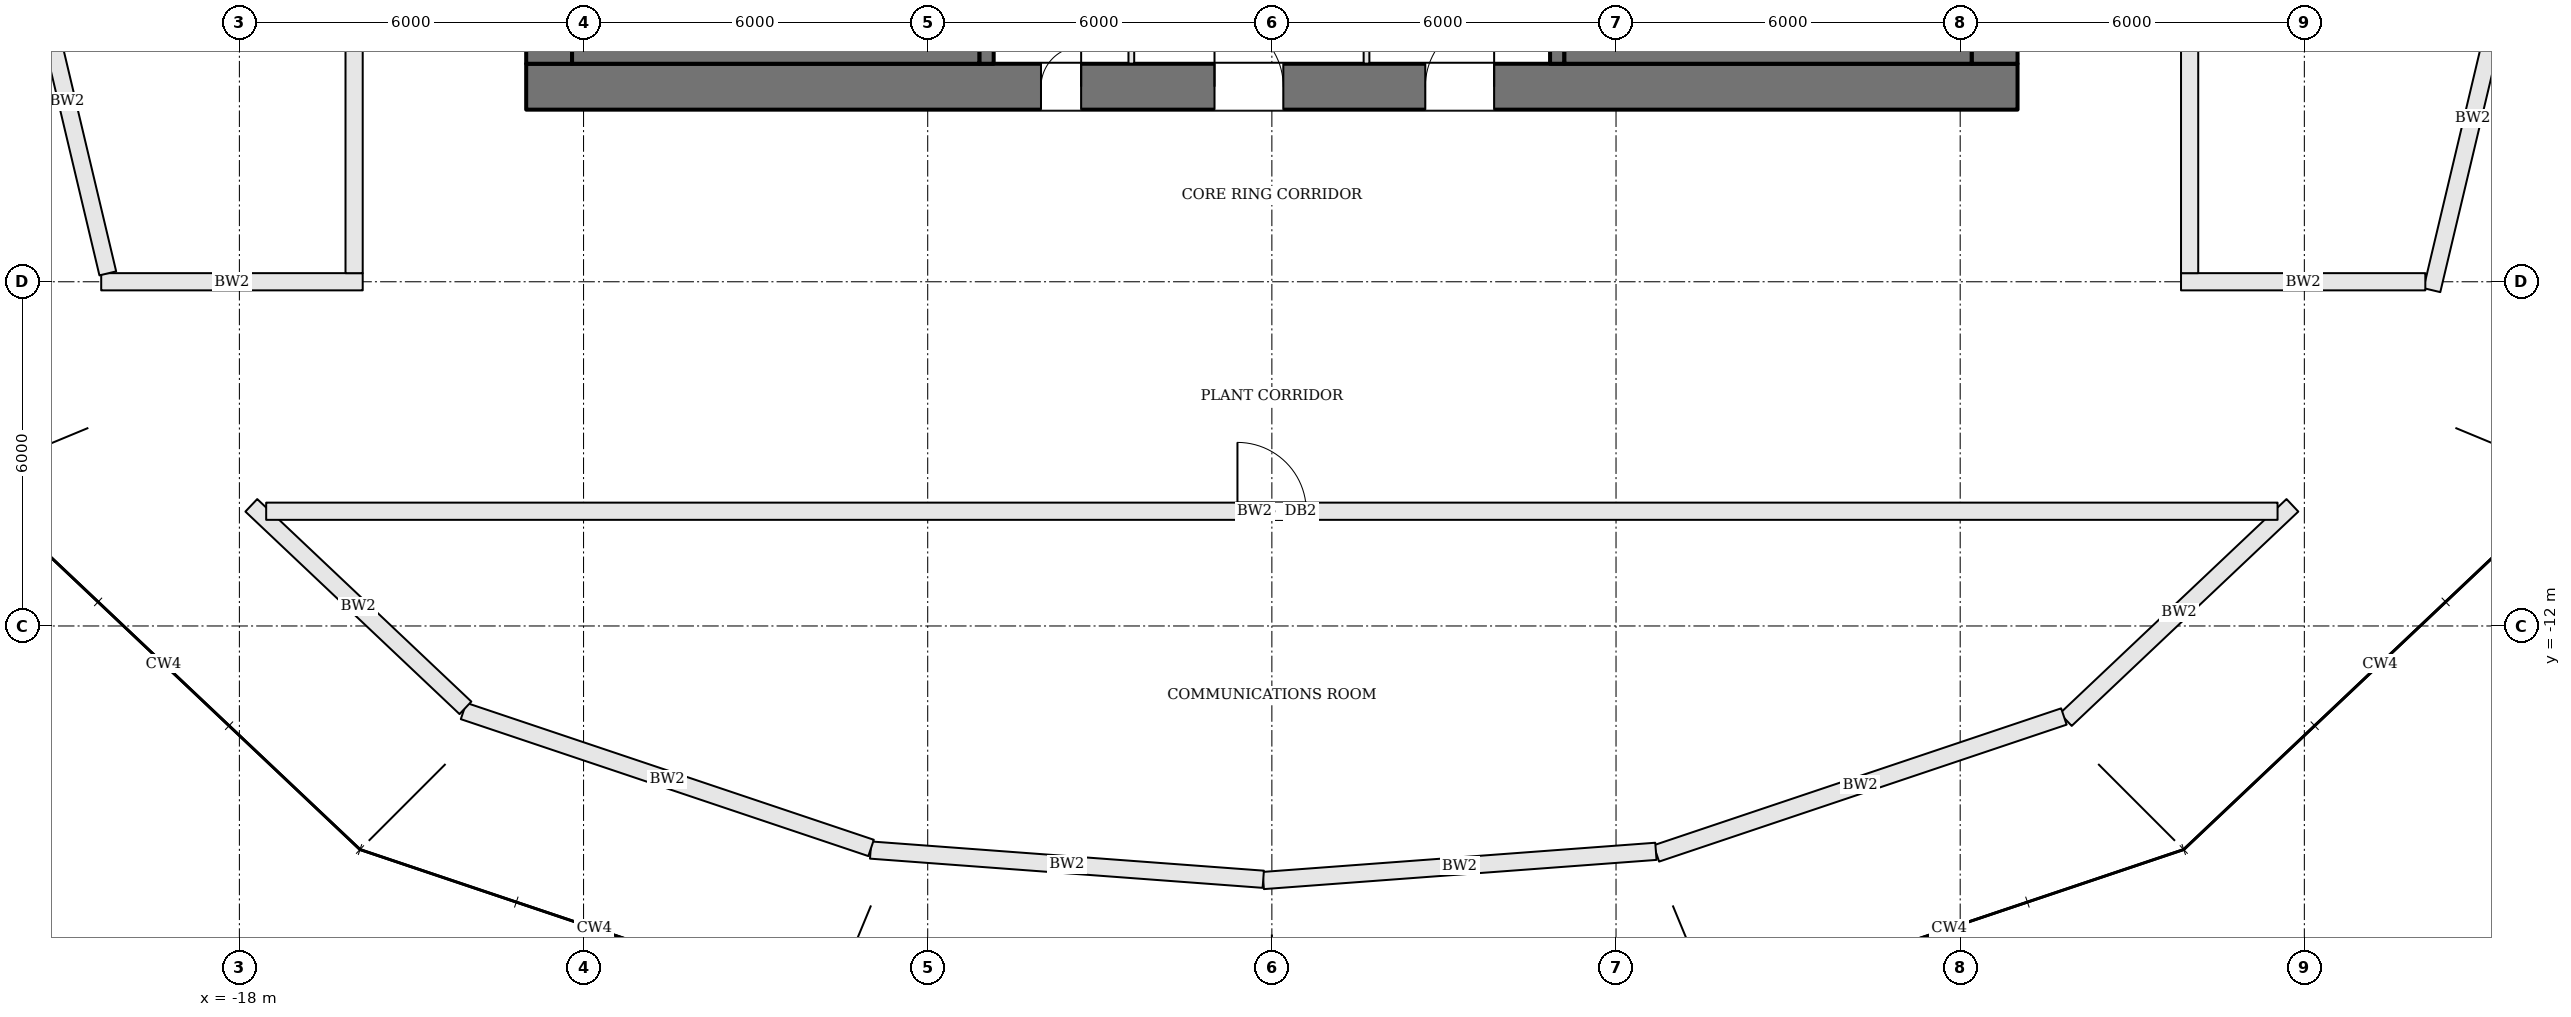
"""IFC4 building model, lengths in metres.
Left out: names, types, materials, properties, quantities, classifications, styles, units other than length and angle.
Written with IfcOpenShell. Run it as: python <this file> out.ifc"""

import sys

from ifc_helpers import new_model, si_unit, direction, frame, frame_2d, origin, place, context, subcontext, project, spatial, rectangle, extrude, element, fill, save


model = new_model("IFC4")
c1 = context("Model", 3, precision=1e-05, world=origin(), true_north=direction((0.0, 1.0)))
c2 = subcontext(c1, "Body", "Model", "MODEL_VIEW")
j1 = project(units=[si_unit("LENGTHUNIT", "METRE"), si_unit("PLANEANGLEUNIT", "RADIAN")], contexts=[c1])
p1 = place(None, origin())
s1 = spatial("IfcSite", under=j1, at=p1, CompositionType="ELEMENT")
p2 = place(p1, origin())
s2 = spatial("IfcBuilding", under=s1, at=p2, CompositionType="ELEMENT")
p3 = place(p2, frame((0.0, 0.0, 312.0)))
s3 = spatial("IfcBuildingStorey", under=s2, at=p3, CompositionType="ELEMENT", Elevation=312.0)
p4 = place(p3, frame((-13.0, -2.6, 0.0), z_axis=(0.0, 0.0, 1.0), x_axis=(1.0, 0.0, 0.0)))
e1 = element("IfcWall", 1, at=p4, inside=s3, PredefinedType="SHEAR", context=c2, shape_type="SweptSolid", body=[
    extrude(rectangle(XDim=26.0, YDim=0.8, at=frame_2d((13.0, 0.0))), origin(), (0.0, 0.0, 1.0), 4.2),
])
p5 = place(p4, frame((8.975, 0.0, 0.0)))
e2 = element("IfcOpeningElement", 2, at=p5, cuts=e1, PredefinedType="OPENING", context=c2, shape_type="SweptSolid", body=[
    extrude(rectangle(XDim=0.7, YDim=2.1, at=frame_2d((0.35, 1.05))), frame((0.0, 0.41, 0.0), z_axis=(0.0, -1.0, 0.0), x_axis=(1.0, 0.0, 0.0)), (0.0, 0.0, 1.0), 0.82),
])
p6 = place(p4, frame((12.0, 0.0, 0.0)))
e3 = element("IfcOpeningElement", 3, at=p6, cuts=e1, PredefinedType="OPENING", context=c2, shape_type="SweptSolid", body=[
    extrude(rectangle(XDim=1.2, YDim=2.1, at=frame_2d((0.6, 1.05))), frame((0.0, 0.41, 0.0), z_axis=(0.0, -1.0, 0.0), x_axis=(1.0, 0.0, 0.0)), (0.0, 0.0, 1.0), 0.82),
])
p7 = place(p4, frame((15.675, 0.0, 0.0)))
e4 = element("IfcOpeningElement", 4, at=p7, cuts=e1, PredefinedType="OPENING", context=c2, shape_type="SweptSolid", body=[
    extrude(rectangle(XDim=1.2, YDim=2.1, at=frame_2d((0.6, 1.05))), frame((0.0, 0.41, 0.0), z_axis=(0.0, -1.0, 0.0), x_axis=(1.0, 0.0, 0.0)), (0.0, 0.0, 1.0), 0.82),
])
p8 = place(p3, frame((12.6, -2.2, 0.0), z_axis=(0.0, 0.0, 1.0), x_axis=(0.0, 1.0, 0.0)))
e5 = element("IfcWall", 5, at=p8, inside=s3, PredefinedType="SHEAR", context=c2, shape_type="SweptSolid", body=[
    extrude(rectangle(XDim=13.4, YDim=0.8, at=frame_2d((6.7, 0.0))), origin(), (0.0, 0.0, 1.0), 4.2),
])
p9 = place(p8, frame((7.4, 0.0, 0.0)))
e6 = element("IfcOpeningElement", 6, at=p9, cuts=e5, PredefinedType="OPENING", context=c2, shape_type="SweptSolid", body=[
    extrude(rectangle(XDim=1.8, YDim=2.1, at=frame_2d((0.9, 1.05))), frame((0.0, 0.41, 0.0), z_axis=(0.0, -1.0, 0.0), x_axis=(1.0, 0.0, 0.0)), (0.0, 0.0, 1.0), 0.82),
])
p10 = place(p3, frame((-12.6, -2.2, 0.0), z_axis=(0.0, 0.0, 1.0), x_axis=(0.0, 1.0, 0.0)))
e7 = element("IfcWall", 7, at=p10, inside=s3, PredefinedType="SHEAR", context=c2, shape_type="SweptSolid", body=[
    extrude(rectangle(XDim=13.4, YDim=0.8, at=frame_2d((6.7, 0.0))), origin(), (0.0, 0.0, 1.0), 4.2),
])
p11 = place(p10, frame((4.2, 0.0, 0.0)))
e8 = element("IfcOpeningElement", 8, at=p11, cuts=e7, PredefinedType="OPENING", context=c2, shape_type="SweptSolid", body=[
    extrude(rectangle(XDim=1.8, YDim=2.1, at=frame_2d((0.9, 1.05))), frame((0.0, 0.41, 0.0), z_axis=(0.0, -1.0, 0.0), x_axis=(1.0, 0.0, 0.0)), (0.0, 0.0, 1.0), 0.82),
])
p12 = place(p3, frame((-4.975, -2.2, 0.0), z_axis=(0.0, 0.0, 1.0), x_axis=(0.0, 1.0, 0.0)))
e9 = element("IfcWall", 9, at=p12, inside=s3, PredefinedType="SOLIDWALL", context=c2, shape_type="SweptSolid", body=[
    extrude(rectangle(XDim=13.4, YDim=0.25, at=frame_2d((6.7, 0.0))), origin(), (0.0, 0.0, 1.0), 4.0),
])
p13 = place(p12, frame((5.25, 0.0, 0.0)))
e10 = element("IfcOpeningElement", 10, at=p13, cuts=e9, PredefinedType="OPENING", context=c2, shape_type="SweptSolid", body=[
    extrude(rectangle(XDim=1.2, YDim=2.1, at=frame_2d((0.6, 1.05))), frame((0.0, 0.135, 0.0), z_axis=(0.0, -1.0, 0.0), x_axis=(1.0, 0.0, 0.0)), (0.0, 0.0, 1.0), 0.27),
])
p14 = place(p3, frame((4.975, 11.2, 0.0), z_axis=(0.0, 0.0, 1.0), x_axis=(0.0, -1.0, 0.0)))
e11 = element("IfcWall", 11, at=p14, inside=s3, PredefinedType="SOLIDWALL", context=c2, shape_type="SweptSolid", body=[
    extrude(rectangle(XDim=13.4, YDim=0.25, at=frame_2d((6.7, 0.0))), origin(), (0.0, 0.0, 1.0), 4.0),
])
p15 = place(p14, frame((5.25, 0.0, 0.0)))
e12 = element("IfcOpeningElement", 12, at=p15, cuts=e11, PredefinedType="OPENING", context=c2, shape_type="SweptSolid", body=[
    extrude(rectangle(XDim=1.2, YDim=2.1, at=frame_2d((0.6, 1.05))), frame((0.0, 0.135, 0.0), z_axis=(0.0, -1.0, 0.0), x_axis=(1.0, 0.0, 0.0)), (0.0, 0.0, 1.0), 0.27),
])
for number, where, z_axis, x_axis in (
    (13, (-12.2, -1.9, 0.0), (0.0, 0.0, 1.0), (1.0, 0.0, 0.0)),
    (14, (12.2, -1.9, 0.0), (0.0, 0.0, 1.0), (-1.0, 0.0, 0.0)),
):
    element("IfcWall", number, at=place(p3, frame(where, z_axis=z_axis, x_axis=x_axis)), inside=s3, PredefinedType="SOLIDWALL", context=c2, shape_type="SweptSolid", body=[
        extrude(rectangle(XDim=7.1, YDim=0.6, at=frame_2d((3.55, 0.0))), origin(), (0.0, 0.0, 1.0), 4.0),
    ])
for number, where, z_axis, x_axis in (
    (15, (-2.45, -2.2, 0.0), (0.0, 0.0, 1.0), (0.0, 1.0, 0.0)),
    (16, (1.65, -2.2, 0.0), (0.0, 0.0, 1.0), (0.0, 1.0, 0.0)),
):
    element("IfcWall", number, at=place(p3, frame(where, z_axis=z_axis, x_axis=x_axis)), inside=s3, PredefinedType="PARTITIONING", context=c2, shape_type="SweptSolid", body=[
        extrude(rectangle(XDim=2.6, YDim=0.1, at=frame_2d((1.3, 0.0))), origin(), (0.0, 0.0, 1.0), 4.0),
    ])
p16 = place(p3, frame((-15.85, -6.0, 0.0), z_axis=(0.0, 0.0, 1.0), x_axis=(-1.0, 0.0, 0.0)))
e17 = element("IfcWall", 17, at=p16, inside=s3, PredefinedType="SOLIDWALL", context=c2, shape_type="SweptSolid", body=[
    extrude(rectangle(XDim=4.559, YDim=0.3, at=frame_2d((2.279, 0.0))), origin(), (0.0, 0.0, 1.0), 3.534),
])
p17 = place(p3, frame((-20.294, -5.854, 0.0), z_axis=(0.0, 0.0, 1.0), x_axis=(-0.231079925788, 0.972934770629, 0.0)))
e18 = element("IfcWall", 18, at=p17, inside=s3, PredefinedType="SOLIDWALL", context=c2, shape_type="SweptSolid", body=[
    extrude(rectangle(XDim=6.167, YDim=0.3, at=frame_2d((3.083, 0.0))), origin(), (0.0, 0.0, 1.0), 3.534),
])
p18 = place(p3, frame((-16.0, 11.442, 0.0), z_axis=(0.0, 0.0, 1.0), x_axis=(0.0, -1.0, 0.0)))
e19 = element("IfcWall", 19, at=p18, inside=s3, PredefinedType="SOLIDWALL", context=c2, shape_type="SweptSolid", body=[
    extrude(rectangle(XDim=17.292, YDim=0.3, at=frame_2d((8.646, 0.0))), origin(), (0.0, 0.0, 1.0), 3.534),
])
p19 = place(p18, frame((6.646, 0.0, 0.0)))
e20 = element("IfcOpeningElement", 20, at=p19, cuts=e19, PredefinedType="OPENING", context=c2, shape_type="SweptSolid", body=[
    extrude(rectangle(XDim=1.0, YDim=2.1, at=frame_2d((0.5, 1.05))), frame((0.0, 0.16, 0.0), z_axis=(0.0, -1.0, 0.0), x_axis=(1.0, 0.0, 0.0)), (0.0, 0.0, 1.0), 0.32),
])
p20 = place(p3, frame((21.649, -0.146, 0.0), z_axis=(0.0, 0.0, 1.0), x_axis=(-0.231042450417, -0.972943670572, 0.0)))
e21 = element("IfcWall", 21, at=p20, inside=s3, PredefinedType="SOLIDWALL", context=c2, shape_type="SweptSolid", body=[
    extrude(rectangle(XDim=6.167, YDim=0.3, at=frame_2d((3.083, 0.0))), origin(), (0.0, 0.0, 1.0), 3.534),
])
p21 = place(p3, frame((20.109, -6.0, 0.0), z_axis=(0.0, 0.0, 1.0), x_axis=(-1.0, 0.0, 0.0)))
e22 = element("IfcWall", 22, at=p21, inside=s3, PredefinedType="SOLIDWALL", context=c2, shape_type="SweptSolid", body=[
    extrude(rectangle(XDim=4.259, YDim=0.3, at=frame_2d((2.129, 0.0))), origin(), (0.0, 0.0, 1.0), 3.534),
])
p22 = place(p3, frame((16.0, -5.85, 0.0), z_axis=(0.0, 0.0, 1.0), x_axis=(0.0, 1.0, 0.0)))
e23 = element("IfcWall", 23, at=p22, inside=s3, PredefinedType="SOLIDWALL", context=c2, shape_type="SweptSolid", body=[
    extrude(rectangle(XDim=17.292, YDim=0.3, at=frame_2d((8.646, 0.0))), origin(), (0.0, 0.0, 1.0), 3.534),
])
p23 = place(p22, frame((9.646, 0.0, 0.0)))
e24 = element("IfcOpeningElement", 24, at=p23, cuts=e23, PredefinedType="OPENING", context=c2, shape_type="SweptSolid", body=[
    extrude(rectangle(XDim=1.0, YDim=2.1, at=frame_2d((0.5, 1.05))), frame((0.0, 0.16, 0.0), z_axis=(0.0, -1.0, 0.0), x_axis=(1.0, 0.0, 0.0)), (0.0, 0.0, 1.0), 0.32),
])
p24 = place(p3, frame((17.792, -9.897, 0.0), z_axis=(0.0, 0.0, 1.0), x_axis=(-0.726585930652, -0.68707560383, 0.0)))
e25 = element("IfcWall", 25, at=p24, inside=s3, PredefinedType="SOLIDWALL", context=c2, shape_type="SweptSolid", body=[
    extrude(rectangle(XDim=5.438, YDim=0.3, at=frame_2d((2.719, 0.0))), origin(), (0.0, 0.0, 1.0), 3.534),
])
p25 = place(p3, frame((13.808, -13.578, 0.0), z_axis=(0.0, 0.0, 1.0), x_axis=(-0.947928211232, -0.318484075505, 0.0)))
e26 = element("IfcWall", 26, at=p25, inside=s3, PredefinedType="SOLIDWALL", context=c2, shape_type="SweptSolid", body=[
    extrude(rectangle(XDim=7.496, YDim=0.3, at=frame_2d((3.748, 0.0))), origin(), (0.0, 0.0, 1.0), 3.534),
])
p26 = place(p3, frame((6.695, -15.928, 0.0), z_axis=(0.0, 0.0, 1.0), x_axis=(-0.997246264305, -0.074161231982, 0.0)))
e27 = element("IfcWall", 27, at=p26, inside=s3, PredefinedType="SOLIDWALL", context=c2, shape_type="SweptSolid", body=[
    extrude(rectangle(XDim=6.864, YDim=0.3, at=frame_2d((3.432, 0.0))), origin(), (0.0, 0.0, 1.0), 3.534),
])
p27 = place(p3, frame((-0.15, -16.415, 0.0), z_axis=(0.0, 0.0, 1.0), x_axis=(-0.99724645992, 0.074158601503, 0.0)))
e28 = element("IfcWall", 28, at=p27, inside=s3, PredefinedType="SOLIDWALL", context=c2, shape_type="SweptSolid", body=[
    extrude(rectangle(XDim=6.864, YDim=0.3, at=frame_2d((3.432, 0.0))), origin(), (0.0, 0.0, 1.0), 3.534),
])
p28 = place(p3, frame((-6.987, -15.869, 0.0), z_axis=(0.0, 0.0, 1.0), x_axis=(-0.947934740842, 0.318464640273, 0.0)))
e29 = element("IfcWall", 29, at=p28, inside=s3, PredefinedType="SOLIDWALL", context=c2, shape_type="SweptSolid", body=[
    extrude(rectangle(XDim=7.495, YDim=0.3, at=frame_2d((3.748, 0.0))), origin(), (0.0, 0.0, 1.0), 3.534),
])
p29 = place(p3, frame((-14.059, -13.427, 0.0), z_axis=(0.0, 0.0, 1.0), x_axis=(-0.726575483066, 0.687086652037, 0.0)))
e30 = element("IfcWall", 30, at=p29, inside=s3, PredefinedType="SOLIDWALL", context=c2, shape_type="SweptSolid", body=[
    extrude(rectangle(XDim=5.138, YDim=0.3, at=frame_2d((2.569, 0.0))), origin(), (0.0, 0.0, 1.0), 3.534),
])
p30 = place(p3, frame((-17.533, -10.0, 0.0), z_axis=(0.0, 0.0, 1.0), x_axis=(1.0, 0.0, 0.0)))
e31 = element("IfcWall", 31, at=p30, inside=s3, PredefinedType="SOLIDWALL", context=c2, shape_type="SweptSolid", body=[
    extrude(rectangle(XDim=35.066, YDim=0.3, at=frame_2d((17.533, 0.0))), origin(), (0.0, 0.0, 1.0), 3.534),
])
p31 = place(p30, frame((16.933, 0.0, 0.0)))
e32 = element("IfcOpeningElement", 32, at=p31, cuts=e31, PredefinedType="OPENING", context=c2, shape_type="SweptSolid", body=[
    extrude(rectangle(XDim=1.2, YDim=2.1, at=frame_2d((0.6, 1.05))), frame((0.0, 0.16, 0.0), z_axis=(0.0, -1.0, 0.0), x_axis=(1.0, 0.0, 0.0)), (0.0, 0.0, 1.0), 0.32),
])
p32 = place(p5, origin())
e33 = element("IfcDoor", 33, at=p32, inside=s3, OperationType="SINGLE_SWING_RIGHT", PredefinedType="DOOR", context=c2, shape_type="SweptSolid", body=[
    extrude(rectangle(XDim=0.7, YDim=2.1, at=frame_2d((0.35, 1.05))), frame((0.0, 0.025, 0.0), z_axis=(0.0, -1.0, 0.0), x_axis=(1.0, 0.0, 0.0)), (0.0, 0.0, 1.0), 0.05),
])
fill(e2, e33)
p33 = place(p6, origin())
e34 = element("IfcDoor", 34, at=p33, inside=s3, OperationType="SINGLE_SWING_LEFT", PredefinedType="DOOR", context=c2, shape_type="SweptSolid", body=[
    extrude(rectangle(XDim=1.2, YDim=2.1, at=frame_2d((0.6, 1.05))), frame((0.0, 0.025, 0.0), z_axis=(0.0, -1.0, 0.0), x_axis=(1.0, 0.0, 0.0)), (0.0, 0.0, 1.0), 0.05),
])
fill(e3, e34)
p34 = place(p7, origin())
e35 = element("IfcDoor", 35, at=p34, inside=s3, OperationType="SINGLE_SWING_RIGHT", PredefinedType="DOOR", context=c2, shape_type="SweptSolid", body=[
    extrude(rectangle(XDim=1.2, YDim=2.1, at=frame_2d((0.6, 1.05))), frame((0.0, 0.025, 0.0), z_axis=(0.0, -1.0, 0.0), x_axis=(1.0, 0.0, 0.0)), (0.0, 0.0, 1.0), 0.05),
])
fill(e4, e35)
p35 = place(p31, origin())
e36 = element("IfcDoor", 36, at=p35, inside=s3, OperationType="SINGLE_SWING_LEFT", PredefinedType="DOOR", context=c2, shape_type="SweptSolid", body=[
    extrude(rectangle(XDim=1.2, YDim=2.1, at=frame_2d((0.6, 1.05))), frame((0.0, 0.025, 0.0), z_axis=(0.0, -1.0, 0.0), x_axis=(1.0, 0.0, 0.0)), (0.0, 0.0, 1.0), 0.05),
])
fill(e32, e36)
save(model, sys.argv[1])
